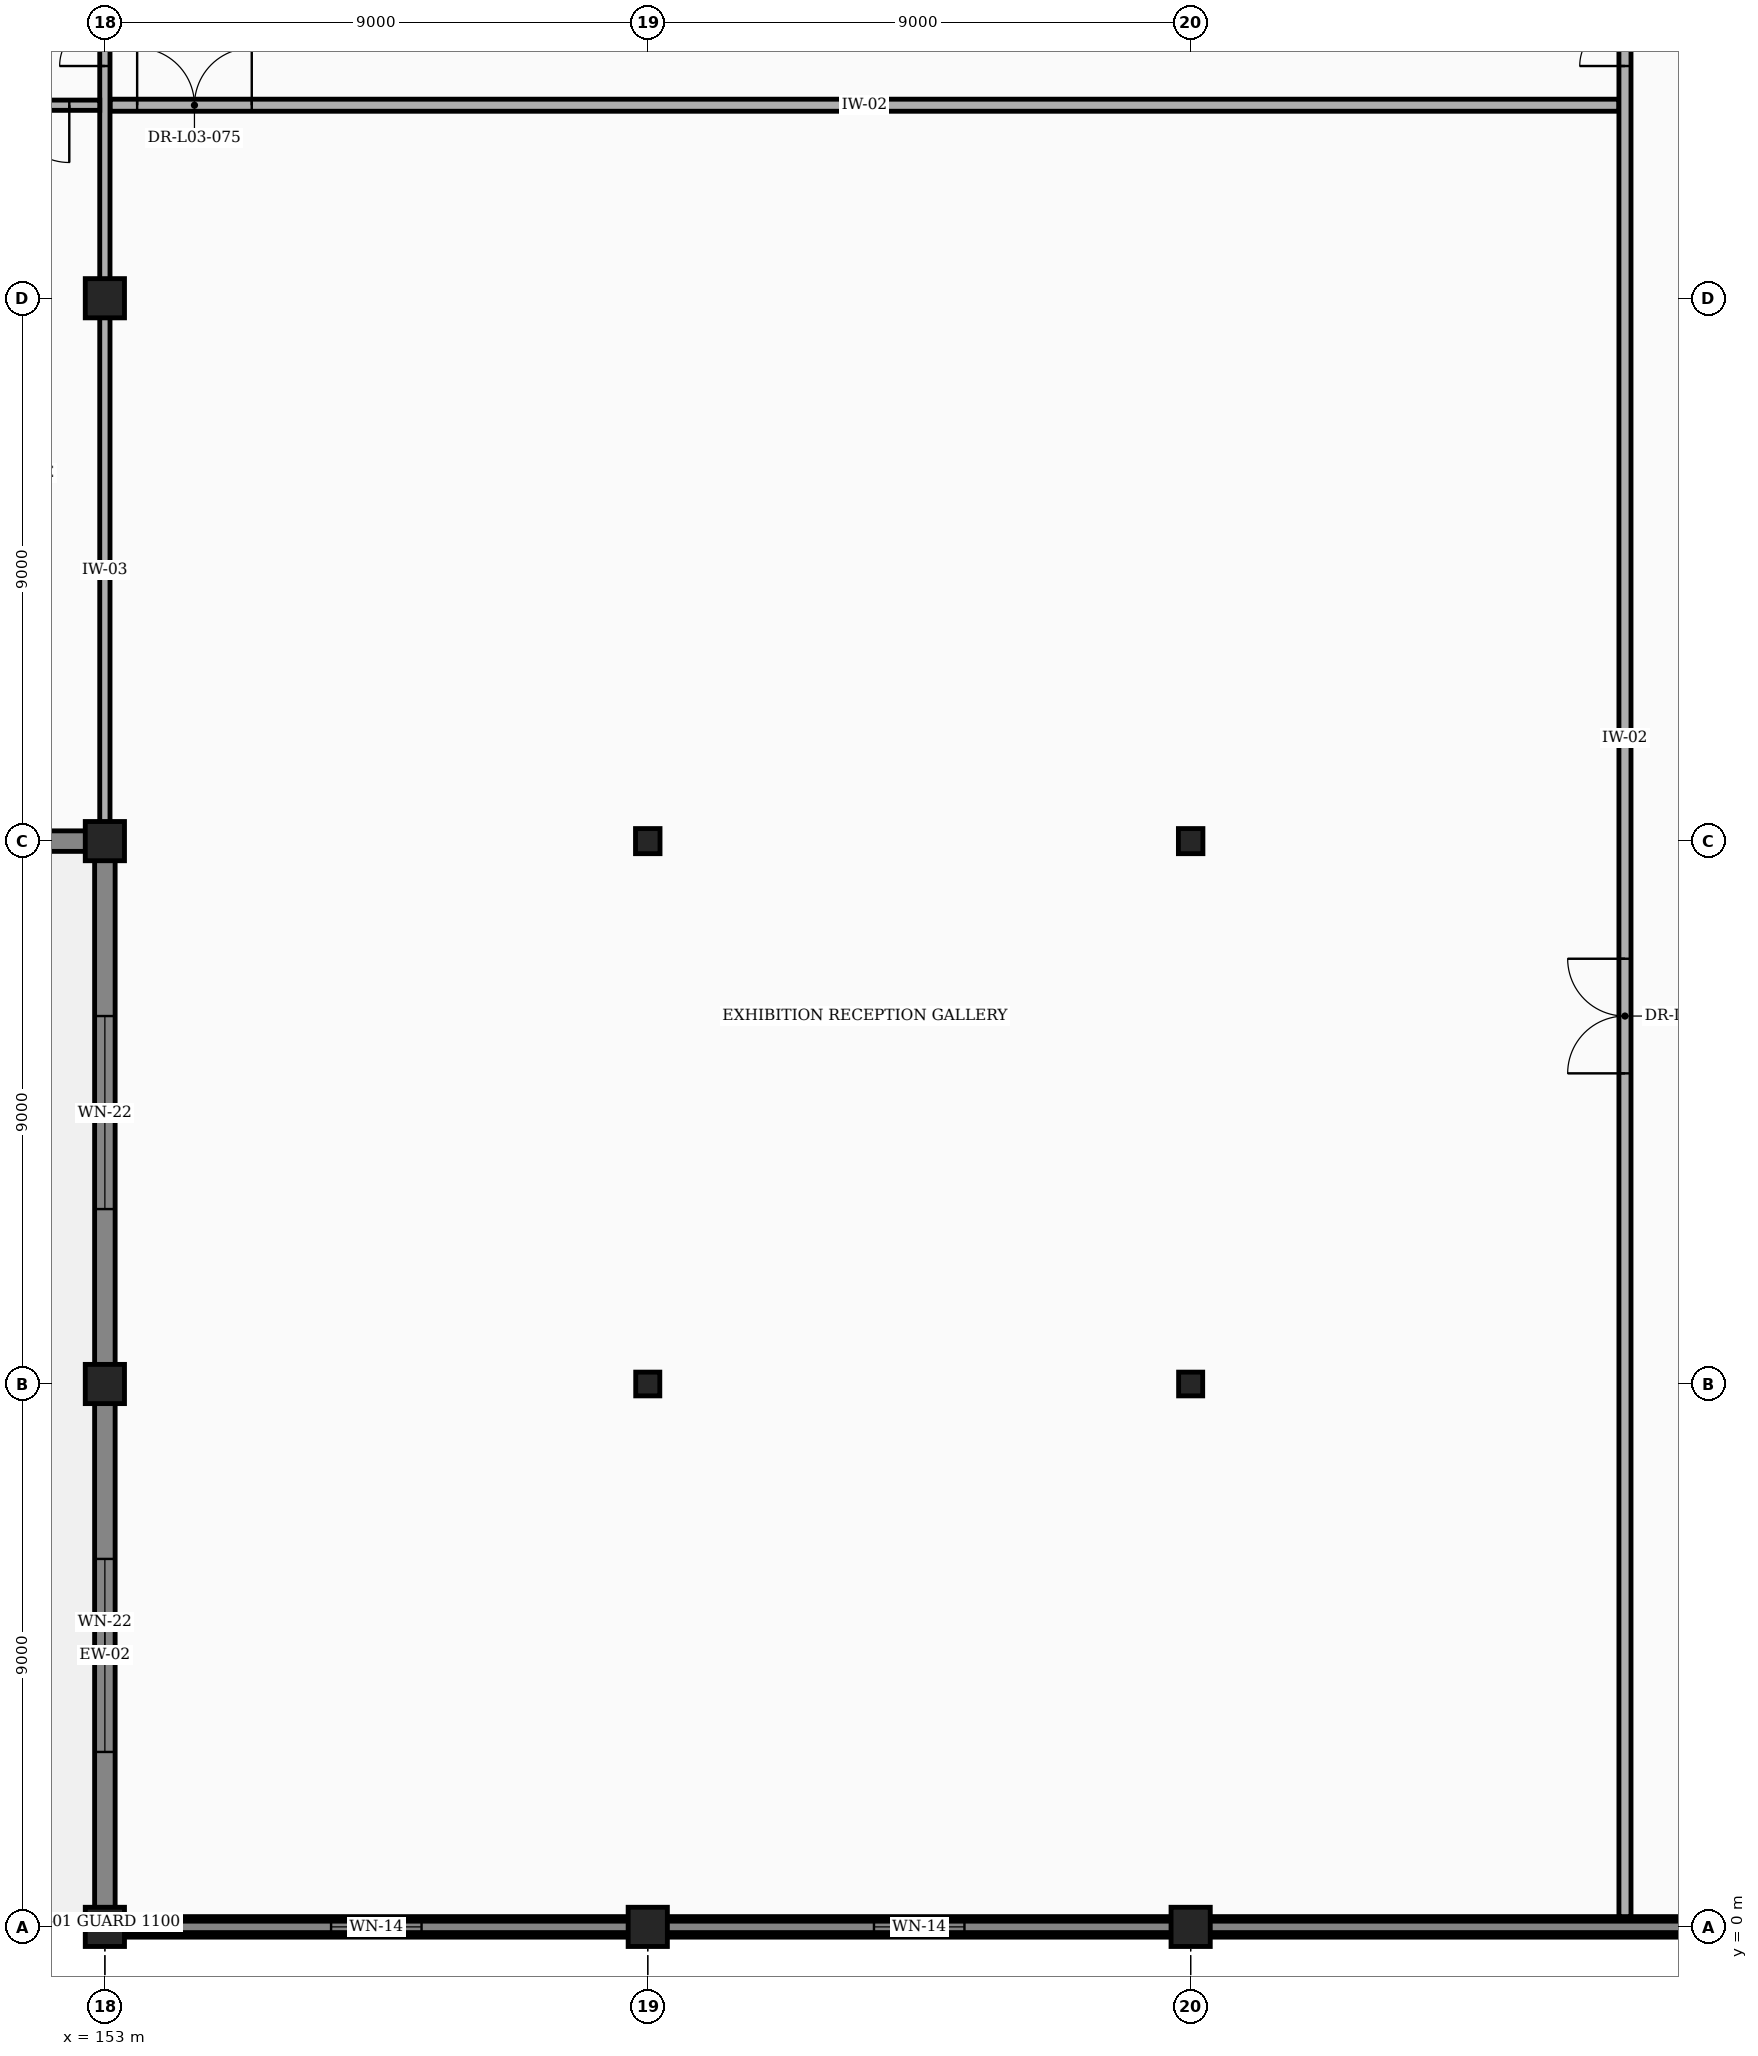
"""IFC4 building model, lengths in metres.
Left out: names, types, materials, properties, quantities, classifications, styles, units other than length and angle.
Written with IfcOpenShell. Run it as: python <this file> out.ifc"""

import sys

from ifc_helpers import new_model, si_unit, direction, frame, frame_2d, origin, origin_2d, place, context, subcontext, project, spatial, rectangle, i_section, extrude, element, fill, save


model = new_model("IFC4")
c1 = context("Model", 3, precision=1e-05, world=origin(), true_north=direction((0.0, 1.0)))
c2 = subcontext(c1, "Body", "Model", "MODEL_VIEW")
j1 = project(units=[si_unit("LENGTHUNIT", "METRE"), si_unit("PLANEANGLEUNIT", "RADIAN")], contexts=[c1])
p1 = place(None, origin())
s1 = spatial("IfcSite", under=j1, at=p1, CompositionType="ELEMENT")
p2 = place(p1, origin())
s2 = spatial("IfcBuilding", under=s1, at=p2, CompositionType="ELEMENT")
p3 = place(p2, frame((0.0, 0.0, 16.8)))
s3 = spatial("IfcBuildingStorey", under=s2, at=p3, CompositionType="ELEMENT", Elevation=16.8)
for number, where, z_axis, x_axis in (
    (1, (153.0, 0.0, 0.0), (0.0, 0.0, 1.0), (1.0, 0.0, 0.0)),
    (2, (153.0, 9.0, 0.0), (0.0, 0.0, 1.0), (1.0, 0.0, 0.0)),
    (3, (153.0, 18.0, 0.0), (0.0, 0.0, 1.0), (1.0, 0.0, 0.0)),
    (4, (153.0, 27.0, 0.0), (0.0, 0.0, 1.0), (1.0, 0.0, 0.0)),
    (5, (162.0, 0.0, 0.0), (0.0, 0.0, 1.0), (1.0, 0.0, 0.0)),
):
    element("IfcColumn", number, at=place(p3, frame(where, z_axis=z_axis, x_axis=x_axis)), inside=s3, PredefinedType="COLUMN", context=c2, shape_type="SweptSolid", body=[
        extrude(rectangle(XDim=0.65, YDim=0.65, at=origin_2d()), origin(), (0.0, 0.0, 1.0), 4.8),
    ])
p4 = place(p3, frame((162.0, 9.0, 0.0), z_axis=(0.0, 0.0, 1.0), x_axis=(1.0, 0.0, 0.0)))
e6 = element("IfcColumn", 6, at=p4, inside=s3, PredefinedType="COLUMN", context=c2, shape_type="SweptSolid", body=[
    extrude(i_section(OverallWidth=0.399, OverallDepth=0.394, WebThickness=0.023, FlangeThickness=0.037, at=origin_2d()), origin(), (0.0, 0.0, 1.0), 4.8),
])
p5 = place(p3, frame((162.0, 18.0, 0.0), z_axis=(0.0, 0.0, 1.0), x_axis=(1.0, 0.0, 0.0)))
e7 = element("IfcColumn", 7, at=p5, inside=s3, PredefinedType="COLUMN", context=c2, shape_type="SweptSolid", body=[
    extrude(i_section(OverallWidth=0.406, OverallDepth=0.416, WebThickness=0.03, FlangeThickness=0.048, at=origin_2d()), origin(), (0.0, 0.0, 1.0), 4.8),
])
p6 = place(p3, frame((171.0, 0.0, 0.0), z_axis=(0.0, 0.0, 1.0), x_axis=(1.0, 0.0, 0.0)))
e8 = element("IfcColumn", 8, at=p6, inside=s3, PredefinedType="COLUMN", context=c2, shape_type="SweptSolid", body=[
    extrude(rectangle(XDim=0.65, YDim=0.65, at=origin_2d()), origin(), (0.0, 0.0, 1.0), 4.8),
])
p7 = place(p3, frame((171.0, 9.0, 0.0), z_axis=(0.0, 0.0, 1.0), x_axis=(1.0, 0.0, 0.0)))
e9 = element("IfcColumn", 9, at=p7, inside=s3, PredefinedType="COLUMN", context=c2, shape_type="SweptSolid", body=[
    extrude(i_section(OverallWidth=0.399, OverallDepth=0.394, WebThickness=0.023, FlangeThickness=0.037, at=origin_2d()), origin(), (0.0, 0.0, 1.0), 4.8),
])
p8 = place(p3, frame((171.0, 18.0, 0.0), z_axis=(0.0, 0.0, 1.0), x_axis=(1.0, 0.0, 0.0)))
e10 = element("IfcColumn", 10, at=p8, inside=s3, PredefinedType="COLUMN", context=c2, shape_type="SweptSolid", body=[
    extrude(i_section(OverallWidth=0.406, OverallDepth=0.416, WebThickness=0.03, FlangeThickness=0.048, at=origin_2d()), origin(), (0.0, 0.0, 1.0), 4.8),
])
p9 = place(p3, frame((153.317, 0.0, 0.0), z_axis=(0.0, 0.0, 1.0), x_axis=(1.0, 0.0, 0.0)))
e11 = element("IfcWall", 11, at=p9, inside=s3, PredefinedType="STANDARD", context=c2, shape_type="SweptSolid", body=[
    extrude(rectangle(XDim=8.366, YDim=0.34, at=frame_2d((4.183, 0.0))), origin(), (0.0, 0.0, 1.0), 4.048),
])
p10 = place(p9, frame((3.433, 0.0, 0.85)))
e12 = element("IfcOpeningElement", 12, at=p10, cuts=e11, PredefinedType="OPENING", context=c2, shape_type="SweptSolid", body=[
    extrude(rectangle(XDim=1.5, YDim=1.8, at=frame_2d((0.75, 0.9))), frame((0.0, 0.182, 0.0), z_axis=(0.0, -1.0, 0.0), x_axis=(1.0, 0.0, 0.0)), (0.0, 0.0, 1.0), 0.364),
])
p11 = place(p3, frame((162.317, 0.0, 0.0), z_axis=(0.0, 0.0, 1.0), x_axis=(1.0, 0.0, 0.0)))
e13 = element("IfcWall", 13, at=p11, inside=s3, PredefinedType="STANDARD", context=c2, shape_type="SweptSolid", body=[
    extrude(rectangle(XDim=8.366, YDim=0.34, at=frame_2d((4.183, 0.0))), origin(), (0.0, 0.0, 1.0), 4.048),
])
p12 = place(p11, frame((3.433, 0.0, 0.85)))
e14 = element("IfcOpeningElement", 14, at=p12, cuts=e13, PredefinedType="OPENING", context=c2, shape_type="SweptSolid", body=[
    extrude(rectangle(XDim=1.5, YDim=1.8, at=frame_2d((0.75, 0.9))), frame((0.0, 0.182, 0.0), z_axis=(0.0, -1.0, 0.0), x_axis=(1.0, 0.0, 0.0)), (0.0, 0.0, 1.0), 0.364),
])
p13 = place(p3, frame((171.317, 0.0, 0.0), z_axis=(0.0, 0.0, 1.0), x_axis=(1.0, 0.0, 0.0)))
e15 = element("IfcWall", 15, at=p13, inside=s3, PredefinedType="STANDARD", context=c2, shape_type="SweptSolid", body=[
    extrude(rectangle(XDim=17.366, YDim=0.34, at=frame_2d((8.683, 0.0))), origin(), (0.0, 0.0, 1.0), 4.048),
])
p14 = place(p13, frame((7.933, 0.0, 0.85)))
e16 = element("IfcOpeningElement", 16, at=p14, cuts=e15, PredefinedType="OPENING", context=c2, shape_type="SweptSolid", body=[
    extrude(rectangle(XDim=1.5, YDim=1.8, at=frame_2d((0.75, 0.9))), frame((0.0, 0.182, 0.0), z_axis=(0.0, -1.0, 0.0), x_axis=(1.0, 0.0, 0.0)), (0.0, 0.0, 1.0), 0.364),
])
p15 = place(p3, frame((135.317, 18.0, 0.0), z_axis=(0.0, 0.0, 1.0), x_axis=(1.0, 0.0, 0.0)))
e17 = element("IfcWall", 17, at=p15, inside=s3, PredefinedType="STANDARD", context=c2, shape_type="SweptSolid", body=[
    extrude(rectangle(XDim=17.366, YDim=0.34, at=frame_2d((8.683, 0.0))), origin(), (0.0, 0.0, 1.0), 4.195),
])
p16 = place(p15, frame((7.933, 0.0, 0.85)))
e18 = element("IfcOpeningElement", 18, at=p16, cuts=e17, PredefinedType="OPENING", context=c2, shape_type="SweptSolid", body=[
    extrude(rectangle(XDim=1.5, YDim=1.8, at=frame_2d((0.75, 0.9))), frame((0.0, 0.182, 0.0), z_axis=(0.0, -1.0, 0.0), x_axis=(1.0, 0.0, 0.0)), (0.0, 0.0, 1.0), 0.364),
])
p17 = place(p15, frame((1.083, 0.0, 0.0)))
e19 = element("IfcOpeningElement", 19, at=p17, cuts=e17, PredefinedType="OPENING", context=c2, shape_type="SweptSolid", body=[
    extrude(rectangle(XDim=2.4, YDim=2.35, at=frame_2d((1.2, 1.175))), frame((0.0, 0.182, 0.0), z_axis=(0.0, -1.0, 0.0), x_axis=(1.0, 0.0, 0.0)), (0.0, 0.0, 1.0), 0.364),
])
p18 = place(p3, frame((153.0, 0.317, 0.0), z_axis=(0.0, 0.0, 1.0), x_axis=(0.0, 1.0, 0.0)))
e20 = element("IfcWall", 20, at=p18, inside=s3, PredefinedType="STANDARD", context=c2, shape_type="SweptSolid", body=[
    extrude(rectangle(XDim=8.366, YDim=0.34, at=frame_2d((4.183, 0.0))), origin(), (0.0, 0.0, 1.0), 4.048),
])
p19 = place(p18, frame((2.583, 0.0, 0.85)))
e21 = element("IfcOpeningElement", 21, at=p19, cuts=e20, PredefinedType="OPENING", context=c2, shape_type="SweptSolid", body=[
    extrude(rectangle(XDim=3.2, YDim=2.2, at=frame_2d((1.6, 1.1))), frame((0.0, 0.182, 0.0), z_axis=(0.0, -1.0, 0.0), x_axis=(1.0, 0.0, 0.0)), (0.0, 0.0, 1.0), 0.364),
])
p20 = place(p3, frame((153.0, 9.317, 0.0), z_axis=(0.0, 0.0, 1.0), x_axis=(0.0, 1.0, 0.0)))
e22 = element("IfcWall", 22, at=p20, inside=s3, PredefinedType="STANDARD", context=c2, shape_type="SweptSolid", body=[
    extrude(rectangle(XDim=8.366, YDim=0.34, at=frame_2d((4.183, 0.0))), origin(), (0.0, 0.0, 1.0), 4.555),
])
p21 = place(p20, frame((2.583, 0.0, 0.85)))
e23 = element("IfcOpeningElement", 23, at=p21, cuts=e22, PredefinedType="OPENING", context=c2, shape_type="SweptSolid", body=[
    extrude(rectangle(XDim=3.2, YDim=2.2, at=frame_2d((1.6, 1.1))), frame((0.0, 0.182, 0.0), z_axis=(0.0, -1.0, 0.0), x_axis=(1.0, 0.0, 0.0)), (0.0, 0.0, 1.0), 0.364),
])
p22 = place(p3, frame((153.0, 0.0, 4.8), z_axis=(0.0, 0.0, 1.0), x_axis=(1.0, 0.0, 0.0)))
e24 = element("IfcWall", 24, at=p22, inside=s3, PredefinedType="PARAPET", context=c2, shape_type="SweptSolid", body=[
    extrude(rectangle(XDim=45.0, YDim=0.19, at=frame_2d((22.5, 0.0))), origin(), (0.0, 0.0, 1.0), 1.2),
])
p23 = place(p3, frame((153.085, 30.2, 0.0), z_axis=(0.0, 0.0, 1.0), x_axis=(1.0, 0.0, 0.0)))
e25 = element("IfcWall", 25, at=p23, inside=s3, PredefinedType="PARTITIONING", context=c2, shape_type="SweptSolid", body=[
    extrude(rectangle(XDim=25.015, YDim=0.2, at=frame_2d((12.508, 0.0))), origin(), (0.0, 0.0, 1.0), 4.555),
])
p24 = place(p23, frame((0.45, 0.0, 0.0)))
e26 = element("IfcOpeningElement", 26, at=p24, cuts=e25, PredefinedType="OPENING", context=c2, shape_type="SweptSolid", body=[
    extrude(rectangle(XDim=1.9, YDim=2.35, at=frame_2d((0.95, 1.175))), frame((0.0, 0.112, 0.0), z_axis=(0.0, -1.0, 0.0), x_axis=(1.0, 0.0, 0.0)), (0.0, 0.0, 1.0), 0.224),
])
p25 = place(p3, frame((178.2, 0.17, 0.0), z_axis=(0.0, 0.0, 1.0), x_axis=(0.0, 1.0, 0.0)))
e27 = element("IfcWall", 27, at=p25, inside=s3, PredefinedType="PARTITIONING", context=c2, shape_type="SweptSolid", body=[
    extrude(rectangle(XDim=39.07, YDim=0.2, at=frame_2d((19.535, 0.0))), origin(), (0.0, 0.0, 1.0), 4.555),
])
p26 = place(p25, frame((13.98, 0.0, 0.0)))
e28 = element("IfcOpeningElement", 28, at=p26, cuts=e27, PredefinedType="OPENING", context=c2, shape_type="SweptSolid", body=[
    extrude(rectangle(XDim=1.9, YDim=2.35, at=frame_2d((0.95, 1.175))), frame((0.0, 0.112, 0.0), z_axis=(0.0, -1.0, 0.0), x_axis=(1.0, 0.0, 0.0)), (0.0, 0.0, 1.0), 0.224),
])
p27 = place(p25, frame((30.68, 0.0, 0.0)))
e29 = element("IfcOpeningElement", 29, at=p27, cuts=e27, PredefinedType="OPENING", context=c2, shape_type="SweptSolid", body=[
    extrude(rectangle(XDim=1.5, YDim=2.2, at=frame_2d((0.75, 1.1))), frame((0.0, 0.112, 0.0), z_axis=(0.0, -1.0, 0.0), x_axis=(1.0, 0.0, 0.0)), (0.0, 0.0, 1.0), 0.224),
])
p28 = place(p25, frame((36.68, 0.0, 0.0)))
e30 = element("IfcOpeningElement", 30, at=p28, cuts=e27, PredefinedType="OPENING", context=c2, shape_type="SweptSolid", body=[
    extrude(rectangle(XDim=1.9, YDim=2.35, at=frame_2d((0.95, 1.175))), frame((0.0, 0.112, 0.0), z_axis=(0.0, -1.0, 0.0), x_axis=(1.0, 0.0, 0.0)), (0.0, 0.0, 1.0), 0.224),
])
p29 = place(p3, frame((153.0, 18.22, 0.0), z_axis=(0.0, 0.0, 1.0), x_axis=(0.0, 1.0, 0.0)))
e31 = element("IfcWall", 31, at=p29, inside=s3, PredefinedType="PARTITIONING", context=c2, shape_type="SweptSolid", body=[
    extrude(rectangle(XDim=8.56, YDim=0.17, at=frame_2d((4.28, 0.0))), origin(), (0.0, 0.0, 1.0), 4.002),
])
p30 = place(p3, frame((153.0, 27.22, 0.0), z_axis=(0.0, 0.0, 1.0), x_axis=(0.0, 1.0, 0.0)))
e32 = element("IfcWall", 32, at=p30, inside=s3, PredefinedType="PARTITIONING", context=c2, shape_type="SweptSolid", body=[
    extrude(rectangle(XDim=8.56, YDim=0.17, at=frame_2d((4.28, 0.0))), origin(), (0.0, 0.0, 1.0), 4.258),
])
p31 = place(p30, frame((3.63, 0.0, 0.0)))
e33 = element("IfcOpeningElement", 33, at=p31, cuts=e32, PredefinedType="OPENING", context=c2, shape_type="SweptSolid", body=[
    extrude(rectangle(XDim=1.5, YDim=2.2, at=frame_2d((0.75, 1.1))), frame((0.0, 0.097, 0.0), z_axis=(0.0, -1.0, 0.0), x_axis=(1.0, 0.0, 0.0)), (0.0, 0.0, 1.0), 0.194),
])
p32 = place(p3, frame((147.06, 30.2, 0.0), z_axis=(0.0, 0.0, 1.0), x_axis=(1.0, 0.0, 0.0)))
e34 = element("IfcWall", 34, at=p32, inside=s3, PredefinedType="PARTITIONING", context=c2, shape_type="SweptSolid", body=[
    extrude(rectangle(XDim=5.855, YDim=0.17, at=frame_2d((2.927, 0.0))), origin(), (0.0, 0.0, 1.0), 4.555),
])
p33 = place(p32, frame((3.45, 0.0, 0.0)))
e35 = element("IfcOpeningElement", 35, at=p33, cuts=e34, PredefinedType="OPENING", context=c2, shape_type="SweptSolid", body=[
    extrude(rectangle(XDim=1.9, YDim=2.35, at=frame_2d((0.95, 1.175))), frame((0.0, 0.097, 0.0), z_axis=(0.0, -1.0, 0.0), x_axis=(1.0, 0.0, 0.0)), (0.0, 0.0, 1.0), 0.194),
])
p34 = place(p10, origin())
e36 = element("IfcWindow", 36, at=p34, inside=s3, PartitioningType="SINGLE_PANEL", PredefinedType="WINDOW", context=c2, shape_type="SweptSolid", body=[
    extrude(rectangle(XDim=1.5, YDim=1.8, at=frame_2d((0.75, 0.9))), frame((0.0, 0.03, 0.0), z_axis=(0.0, -1.0, 0.0), x_axis=(1.0, 0.0, 0.0)), (0.0, 0.0, 1.0), 0.06),
])
fill(e12, e36)
p35 = place(p12, origin())
e37 = element("IfcWindow", 37, at=p35, inside=s3, PartitioningType="SINGLE_PANEL", PredefinedType="WINDOW", context=c2, shape_type="SweptSolid", body=[
    extrude(rectangle(XDim=1.5, YDim=1.8, at=frame_2d((0.75, 0.9))), frame((0.0, 0.03, 0.0), z_axis=(0.0, -1.0, 0.0), x_axis=(1.0, 0.0, 0.0)), (0.0, 0.0, 1.0), 0.06),
])
fill(e14, e37)
p36 = place(p19, origin())
e38 = element("IfcWindow", 38, at=p36, inside=s3, PartitioningType="SINGLE_PANEL", PredefinedType="WINDOW", context=c2, shape_type="SweptSolid", body=[
    extrude(rectangle(XDim=3.2, YDim=2.2, at=frame_2d((1.6, 1.1))), frame((0.0, 0.03, 0.0), z_axis=(0.0, -1.0, 0.0), x_axis=(1.0, 0.0, 0.0)), (0.0, 0.0, 1.0), 0.06),
])
fill(e21, e38)
p37 = place(p21, origin())
e39 = element("IfcWindow", 39, at=p37, inside=s3, PartitioningType="SINGLE_PANEL", PredefinedType="WINDOW", context=c2, shape_type="SweptSolid", body=[
    extrude(rectangle(XDim=3.2, YDim=2.2, at=frame_2d((1.6, 1.1))), frame((0.0, 0.03, 0.0), z_axis=(0.0, -1.0, 0.0), x_axis=(1.0, 0.0, 0.0)), (0.0, 0.0, 1.0), 0.06),
])
fill(e23, e39)
p38 = place(p24, origin())
e40 = element("IfcDoor", 40, at=p38, inside=s3, OperationType="DOUBLE_DOOR_SINGLE_SWING", PredefinedType="DOOR", context=c2, shape_type="SweptSolid", body=[
    extrude(rectangle(XDim=1.9, YDim=2.35, at=frame_2d((0.95, 1.175))), frame((0.0, 0.025, 0.0), z_axis=(0.0, -1.0, 0.0), x_axis=(1.0, 0.0, 0.0)), (0.0, 0.0, 1.0), 0.05),
])
fill(e26, e40)
p39 = place(p26, origin())
e41 = element("IfcDoor", 41, at=p39, inside=s3, OperationType="DOUBLE_DOOR_SINGLE_SWING", PredefinedType="DOOR", context=c2, shape_type="SweptSolid", body=[
    extrude(rectangle(XDim=1.9, YDim=2.35, at=frame_2d((0.95, 1.175))), frame((0.0, 0.025, 0.0), z_axis=(0.0, -1.0, 0.0), x_axis=(1.0, 0.0, 0.0)), (0.0, 0.0, 1.0), 0.05),
])
fill(e28, e41)
p40 = place(p27, origin())
e42 = element("IfcDoor", 42, at=p40, inside=s3, OperationType="DOUBLE_DOOR_SINGLE_SWING", PredefinedType="DOOR", context=c2, shape_type="SweptSolid", body=[
    extrude(rectangle(XDim=1.5, YDim=2.2, at=frame_2d((0.75, 1.1))), frame((0.0, 0.025, 0.0), z_axis=(0.0, -1.0, 0.0), x_axis=(1.0, 0.0, 0.0)), (0.0, 0.0, 1.0), 0.05),
])
fill(e29, e42)
p41 = place(p31, origin())
e43 = element("IfcDoor", 43, at=p41, inside=s3, OperationType="DOUBLE_DOOR_SINGLE_SWING", PredefinedType="DOOR", context=c2, shape_type="SweptSolid", body=[
    extrude(rectangle(XDim=1.5, YDim=2.2, at=frame_2d((0.75, 1.1))), frame((0.0, 0.025, 0.0), z_axis=(0.0, -1.0, 0.0), x_axis=(1.0, 0.0, 0.0)), (0.0, 0.0, 1.0), 0.05),
])
fill(e33, e43)
p42 = place(p33, frame((1.9, 0.0, 0.0), z_axis=(0.0, 0.0, 1.0), x_axis=(-1.0, 0.0, 0.0)))
e44 = element("IfcDoor", 44, at=p42, inside=s3, OperationType="DOUBLE_DOOR_SINGLE_SWING", PredefinedType="DOOR", context=c2, shape_type="SweptSolid", body=[
    extrude(rectangle(XDim=1.9, YDim=2.35, at=frame_2d((0.95, 1.175))), frame((0.0, 0.025, 0.0), z_axis=(0.0, -1.0, 0.0), x_axis=(1.0, 0.0, 0.0)), (0.0, 0.0, 1.0), 0.05),
])
fill(e35, e44)
save(model, sys.argv[1])
